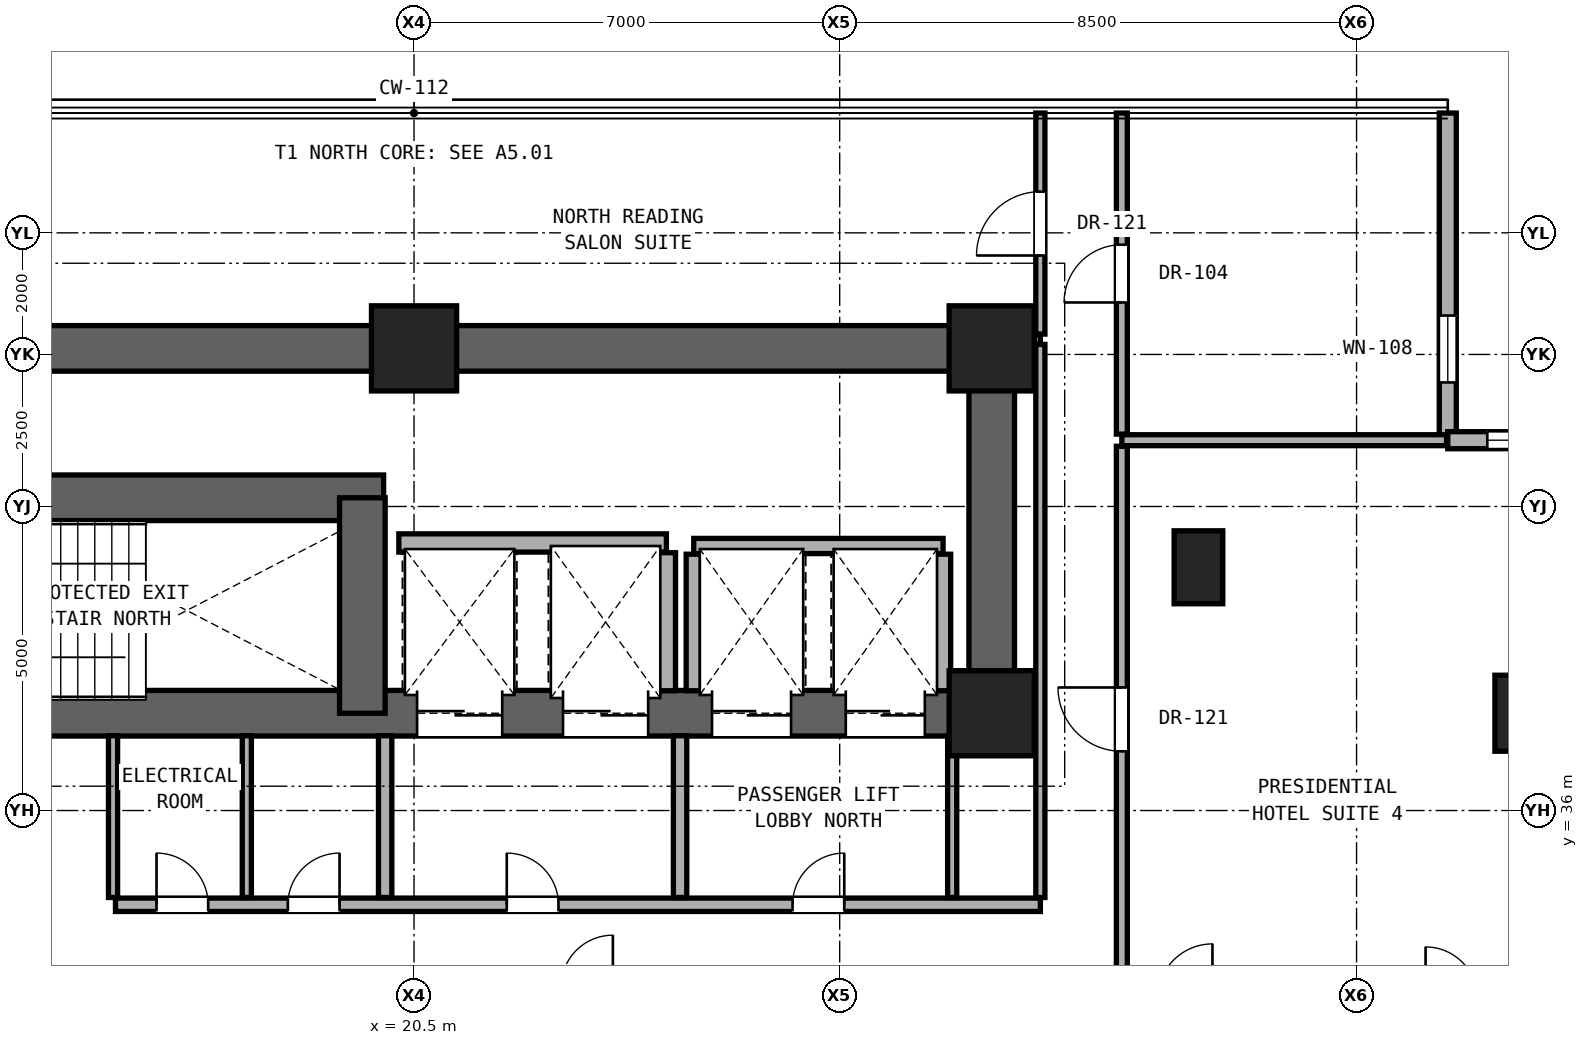
"""IFC4 building model, lengths in metres.
Left out: names, types, materials, properties, quantities, classifications, styles, units other than length and angle.
Written with IfcOpenShell. Run it as: python <this file> out.ifc"""

import sys

from ifc_helpers import new_model, si_unit, direction, frame, frame_2d, origin, origin_2d, place, context, subcontext, project, spatial, rectangle, hollow_rectangle, extrude, element, fill, save


model = new_model("IFC4")
c1 = context("Model", 3, precision=1e-05, world=origin(), true_north=direction((0.0, 1.0)))
c2 = subcontext(c1, "Body", "Model", "MODEL_VIEW")
j1 = project(units=[si_unit("LENGTHUNIT", "METRE"), si_unit("PLANEANGLEUNIT", "RADIAN")], contexts=[c1])
p1 = place(None, origin())
s1 = spatial("IfcSite", under=j1, at=p1, CompositionType="ELEMENT")
p2 = place(p1, origin())
s2 = spatial("IfcBuilding", under=s1, at=p2, CompositionType="ELEMENT")
p3 = place(p2, frame((0.0, 0.0, 38.9)))
s3 = spatial("IfcBuildingStorey", under=s2, at=p3, CompositionType="ELEMENT", Elevation=38.9)
for number, where, z_axis, x_axis in (
    (1, (30.0, 37.6, 0.0), (0.0, 0.0, 1.0), (1.0, 0.0, 0.0)),
    (2, (20.5, 43.6, 0.0), (0.0, 0.0, 1.0), (1.0, 0.0, 0.0)),
    (3, (30.0, 43.6, 0.0), (0.0, 0.0, 1.0), (1.0, 0.0, 0.0)),
):
    element("IfcColumn", number, at=place(p3, frame(where, z_axis=z_axis, x_axis=x_axis)), inside=s3, PredefinedType="COLUMN", context=c2, shape_type="SweptSolid", body=[
        extrude(rectangle(XDim=1.4, YDim=1.4, at=origin_2d()), origin(), (0.0, 0.0, 1.0), 3.3),
    ])
p4 = place(p3, frame((38.9, 37.6, 0.0), z_axis=(0.0, 0.0, 1.0), x_axis=(1.0, 0.0, 0.0)))
e4 = element("IfcColumn", 4, at=p4, inside=s3, PredefinedType="COLUMN", context=c2, shape_type="SweptSolid", body=[
    extrude(hollow_rectangle(XDim=1.25, YDim=1.25, WallThickness=0.07, at=origin_2d()), origin(), (0.0, 0.0, 1.0), 3.3),
])
p5 = place(p3, frame((33.4, 40.0, 0.0), z_axis=(0.0, 0.0, 1.0), x_axis=(1.0, 0.0, 0.0)))
e5 = element("IfcColumn", 5, at=p5, inside=s3, PredefinedType="PILASTER", context=c2, shape_type="SweptSolid", body=[
    extrude(rectangle(XDim=0.8, YDim=1.2, at=origin_2d()), origin(), (0.0, 0.0, 1.0), 3.3),
])
p6 = place(p3, frame((11.0, 43.6, 0.0), z_axis=(0.0, 0.0, 1.0), x_axis=(1.0, 0.0, 0.0)))
e6 = element("IfcWall", 6, at=p6, inside=s3, PredefinedType="SHEAR", context=c2, shape_type="SweptSolid", body=[
    extrude(rectangle(XDim=19.0, YDim=0.75, at=frame_2d((9.5, 0.0))), origin(), (0.0, 0.0, 1.0), 3.06),
])
p7 = place(p3, frame((30.0, 37.6, 0.0), z_axis=(0.0, 0.0, 1.0), x_axis=(0.0, 1.0, 0.0)))
e7 = element("IfcWall", 7, at=p7, inside=s3, PredefinedType="SHEAR", context=c2, shape_type="SweptSolid", body=[
    extrude(rectangle(XDim=6.0, YDim=0.75, at=frame_2d((3.0, 0.0))), origin(), (0.0, 0.0, 1.0), 3.06),
])
p8 = place(p3, frame((11.0, 37.6, 0.0), z_axis=(0.0, 0.0, 1.0), x_axis=(1.0, 0.0, 0.0)))
e8 = element("IfcWall", 8, at=p8, inside=s3, PredefinedType="SHEAR", context=c2, shape_type="SweptSolid", body=[
    extrude(rectangle(XDim=19.0, YDim=0.75, at=frame_2d((9.5, 0.0))), origin(), (0.0, 0.0, 1.0), 3.06),
])
p9 = place(p8, frame((1.06, 0.0, 0.0)))
e9 = element("IfcOpeningElement", 9, at=p9, cuts=e8, PredefinedType="OPENING", context=c2, shape_type="SweptSolid", body=[
    extrude(rectangle(XDim=1.15, YDim=2.2, at=frame_2d((0.575, 1.1))), frame((0.0, 0.385, 0.0), z_axis=(0.0, -1.0, 0.0), x_axis=(1.0, 0.0, 0.0)), (0.0, 0.0, 1.0), 0.77),
])
p10 = place(p8, frame((9.55, 0.0, 0.0)))
e10 = element("IfcOpeningElement", 10, at=p10, cuts=e8, PredefinedType="OPENING", context=c2, shape_type="SweptSolid", body=[
    extrude(rectangle(XDim=1.4, YDim=2.35, at=frame_2d((0.7, 1.175))), frame((0.0, 0.385, 0.0), z_axis=(0.0, -1.0, 0.0), x_axis=(1.0, 0.0, 0.0)), (0.0, 0.0, 1.0), 0.77),
])
p11 = place(p8, frame((11.95, 0.0, 0.0)))
e11 = element("IfcOpeningElement", 11, at=p11, cuts=e8, PredefinedType="OPENING", context=c2, shape_type="SweptSolid", body=[
    extrude(rectangle(XDim=1.4, YDim=2.35, at=frame_2d((0.7, 1.175))), frame((0.0, 0.385, 0.0), z_axis=(0.0, -1.0, 0.0), x_axis=(1.0, 0.0, 0.0)), (0.0, 0.0, 1.0), 0.77),
])
p12 = place(p8, frame((14.4, 0.0, 0.0)))
e12 = element("IfcOpeningElement", 12, at=p12, cuts=e8, PredefinedType="OPENING", context=c2, shape_type="SweptSolid", body=[
    extrude(rectangle(XDim=1.3, YDim=2.3, at=frame_2d((0.65, 1.15))), frame((0.0, 0.385, 0.0), z_axis=(0.0, -1.0, 0.0), x_axis=(1.0, 0.0, 0.0)), (0.0, 0.0, 1.0), 0.77),
])
p13 = place(p8, frame((16.6, 0.0, 0.0)))
e13 = element("IfcOpeningElement", 13, at=p13, cuts=e8, PredefinedType="OPENING", context=c2, shape_type="SweptSolid", body=[
    extrude(rectangle(XDim=1.3, YDim=2.3, at=frame_2d((0.65, 1.15))), frame((0.0, 0.385, 0.0), z_axis=(0.0, -1.0, 0.0), x_axis=(1.0, 0.0, 0.0)), (0.0, 0.0, 1.0), 0.77),
])
p14 = place(p3, frame((11.0, 41.143, 0.0), z_axis=(0.0, 0.0, 1.0), x_axis=(1.0, 0.0, 0.0)))
e14 = element("IfcWall", 14, at=p14, inside=s3, PredefinedType="SHEAR", context=c2, shape_type="SweptSolid", body=[
    extrude(rectangle(XDim=9.0, YDim=0.75, at=frame_2d((4.5, 0.0))), origin(), (0.0, 0.0, 1.0), 3.06),
])
p15 = place(p3, frame((19.65, 37.6, 0.0), z_axis=(0.0, 0.0, 1.0), x_axis=(0.0, 1.0, 0.0)))
e15 = element("IfcWall", 15, at=p15, inside=s3, PredefinedType="SHEAR", context=c2, shape_type="SweptSolid", body=[
    extrude(rectangle(XDim=3.543, YDim=0.75, at=frame_2d((1.771, 0.0))), origin(), (0.0, 0.0, 1.0), 3.06),
])
p16 = place(p3, frame((37.5, 42.09, 0.0), z_axis=(0.0, 0.0, 1.0), x_axis=(0.0, 1.0, 0.0)))
e16 = element("IfcWall", 16, at=p16, inside=s3, PredefinedType="SOLIDWALL", context=c2, shape_type="SweptSolid", body=[
    extrude(rectangle(XDim=5.38, YDim=0.28, at=frame_2d((2.69, 0.0))), origin(), (0.0, 0.0, 1.0), 3.04),
])
p17 = place(p16, frame((0.95, 0.0, 0.85)))
e17 = element("IfcOpeningElement", 17, at=p17, cuts=e16, PredefinedType="OPENING", context=c2, shape_type="SweptSolid", body=[
    extrude(rectangle(XDim=1.1, YDim=2.0, at=frame_2d((0.55, 1.0))), frame((0.0, 0.15, 0.0), z_axis=(0.0, -1.0, 0.0), x_axis=(1.0, 0.0, 0.0)), (0.0, 0.0, 1.0), 0.3),
])
p18 = place(p3, frame((42.88, 42.09, 0.0), z_axis=(0.0, 0.0, 1.0), x_axis=(-1.0, 0.0, 0.0)))
e18 = element("IfcWall", 18, at=p18, inside=s3, PredefinedType="SOLIDWALL", context=c2, shape_type="SweptSolid", body=[
    extrude(rectangle(XDim=5.38, YDim=0.28, at=frame_2d((2.69, 0.0))), origin(), (0.0, 0.0, 1.0), 3.04),
])
p19 = place(p18, frame((3.63, 0.0, 0.85)))
e19 = element("IfcOpeningElement", 19, at=p19, cuts=e18, PredefinedType="OPENING", context=c2, shape_type="SweptSolid", body=[
    extrude(rectangle(XDim=1.1, YDim=2.0, at=frame_2d((0.55, 1.0))), frame((0.0, 0.15, 0.0), z_axis=(0.0, -1.0, 0.0), x_axis=(1.0, 0.0, 0.0)), (0.0, 0.0, 1.0), 0.3),
])
p20 = place(p3, frame((15.59, 34.45, 0.0), z_axis=(0.0, 0.0, 1.0), x_axis=(1.0, 0.0, 0.0)))
e20 = element("IfcWall", 20, at=p20, inside=s3, PredefinedType="SOLIDWALL", context=c2, shape_type="SweptSolid", body=[
    extrude(rectangle(XDim=15.21, YDim=0.22, at=frame_2d((7.605, 0.0))), origin(), (0.0, 0.0, 1.0), 2.104),
])
p21 = place(p20, frame((6.435, 0.0, 0.0)))
e21 = element("IfcOpeningElement", 21, at=p21, cuts=e20, PredefinedType="OPENING", context=c2, shape_type="SweptSolid", body=[
    extrude(rectangle(XDim=0.85, YDim=2.01, at=frame_2d((0.425, 1.005))), frame((0.0, 0.12, 0.0), z_axis=(0.0, -1.0, 0.0), x_axis=(1.0, 0.0, 0.0)), (0.0, 0.0, 1.0), 0.24),
])
p22 = place(p20, frame((11.135, 0.0, 0.0)))
e22 = element("IfcOpeningElement", 22, at=p22, cuts=e20, PredefinedType="OPENING", context=c2, shape_type="SweptSolid", body=[
    extrude(rectangle(XDim=0.85, YDim=2.01, at=frame_2d((0.425, 1.005))), frame((0.0, 0.12, 0.0), z_axis=(0.0, -1.0, 0.0), x_axis=(1.0, 0.0, 0.0)), (0.0, 0.0, 1.0), 0.24),
])
p23 = place(p20, frame((0.675, 0.0, 0.0)))
e23 = element("IfcOpeningElement", 23, at=p23, cuts=e20, PredefinedType="OPENING", context=c2, shape_type="SweptSolid", body=[
    extrude(rectangle(XDim=0.85, YDim=2.01, at=frame_2d((0.425, 1.005))), frame((0.0, 0.12, 0.0), z_axis=(0.0, -1.0, 0.0), x_axis=(1.0, 0.0, 0.0)), (0.0, 0.0, 1.0), 0.24),
])
p24 = place(p20, frame((2.835, 0.0, 0.0)))
e24 = element("IfcOpeningElement", 24, at=p24, cuts=e20, PredefinedType="OPENING", context=c2, shape_type="SweptSolid", body=[
    extrude(rectangle(XDim=0.85, YDim=2.01, at=frame_2d((0.425, 1.005))), frame((0.0, 0.12, 0.0), z_axis=(0.0, -1.0, 0.0), x_axis=(1.0, 0.0, 0.0)), (0.0, 0.0, 1.0), 0.24),
])
p25 = place(p3, frame((25.1, 40.35, 0.0), z_axis=(0.0, 0.0, 1.0), x_axis=(1.0, 0.0, 0.0)))
e25 = element("IfcWall", 25, at=p25, inside=s3, PredefinedType="SOLIDWALL", context=c2, shape_type="SweptSolid", body=[
    extrude(rectangle(XDim=4.1, YDim=0.25, at=frame_2d((2.05, 0.0))), origin(), (0.0, 0.0, 1.0), 3.06),
])
p26 = place(p3, frame((20.25, 40.4, 0.0), z_axis=(0.0, 0.0, 1.0), x_axis=(1.0, 0.0, 0.0)))
e26 = element("IfcWall", 26, at=p26, inside=s3, PredefinedType="SOLIDWALL", context=c2, shape_type="SweptSolid", body=[
    extrude(rectangle(XDim=4.4, YDim=0.3, at=frame_2d((2.2, 0.0))), origin(), (0.0, 0.0, 1.0), 3.06),
])
p27 = place(p3, frame((32.14, 42.09, 0.0), z_axis=(0.0, 0.0, 1.0), x_axis=(1.0, 0.0, 0.0)))
e27 = element("IfcWall", 27, at=p27, inside=s3, PredefinedType="PARTITIONING", context=c2, shape_type="SweptSolid", body=[
    extrude(rectangle(XDim=5.34, YDim=0.18, at=frame_2d((2.67, 0.0))), origin(), (0.0, 0.0, 1.0), 3.06),
])
p28 = place(p3, frame((30.37, 43.75, 0.0), z_axis=(0.0, 0.0, 1.0), x_axis=(1.0, 0.0, 0.0)))
e28 = element("IfcWall", 28, at=p28, inside=s3, PredefinedType="PARTITIONING", context=c2, shape_type="SweptSolid", body=[
    extrude(rectangle(XDim=0.43, YDim=0.15, at=frame_2d((0.215, 0.0))), origin(), (0.0, 0.0, 1.0), 3.06),
])
p29 = place(p3, frame((15.55, 34.57, 0.0), z_axis=(0.0, 0.0, 1.0), x_axis=(0.0, 1.0, 0.0)))
e29 = element("IfcWall", 29, at=p29, inside=s3, PredefinedType="PARTITIONING", context=c2, shape_type="SweptSolid", body=[
    extrude(rectangle(XDim=2.66, YDim=0.15, at=frame_2d((1.33, 0.0))), origin(), (0.0, 0.0, 1.0), 2.589),
])
p30 = place(p3, frame((17.75, 34.57, 0.0), z_axis=(0.0, 0.0, 1.0), x_axis=(0.0, 1.0, 0.0)))
e30 = element("IfcWall", 30, at=p30, inside=s3, PredefinedType="PARTITIONING", context=c2, shape_type="SweptSolid", body=[
    extrude(rectangle(XDim=2.66, YDim=0.15, at=frame_2d((1.33, 0.0))), origin(), (0.0, 0.0, 1.0), 3.06),
])
p31 = place(p3, frame((20.025, 34.57, 0.0), z_axis=(0.0, 0.0, 1.0), x_axis=(0.0, 1.0, 0.0)))
e31 = element("IfcWall", 31, at=p31, inside=s3, PredefinedType="SOLIDWALL", context=c2, shape_type="SweptSolid", body=[
    extrude(rectangle(XDim=2.66, YDim=0.22, at=frame_2d((1.33, 0.0))), origin(), (0.0, 0.0, 1.0), 3.06),
])
p32 = place(p3, frame((24.65, 37.97, 0.0), z_axis=(0.0, 0.0, 1.0), x_axis=(0.0, 1.0, 0.0)))
e32 = element("IfcWall", 32, at=p32, inside=s3, PredefinedType="SOLIDWALL", context=c2, shape_type="SweptSolid", body=[
    extrude(rectangle(XDim=2.27, YDim=0.3, at=frame_2d((1.135, 0.0))), origin(), (0.0, 0.0, 1.0), 3.06),
])
p33 = place(p3, frame((24.875, 34.57, 0.0), z_axis=(0.0, 0.0, 1.0), x_axis=(0.0, 1.0, 0.0)))
e33 = element("IfcWall", 33, at=p33, inside=s3, PredefinedType="SOLIDWALL", context=c2, shape_type="SweptSolid", body=[
    extrude(rectangle(XDim=2.66, YDim=0.22, at=frame_2d((1.33, 0.0))), origin(), (0.0, 0.0, 1.0), 3.06),
])
p34 = place(p3, frame((25.1, 37.97, 0.0), z_axis=(0.0, 0.0, 1.0), x_axis=(0.0, 1.0, 0.0)))
e34 = element("IfcWall", 34, at=p34, inside=s3, PredefinedType="SOLIDWALL", context=c2, shape_type="SweptSolid", body=[
    extrude(rectangle(XDim=2.245, YDim=0.25, at=frame_2d((1.123, 0.0))), origin(), (0.0, 0.0, 1.0), 3.06),
])
p35 = place(p3, frame((29.35, 34.57, 0.0), z_axis=(0.0, 0.0, 1.0), x_axis=(0.0, 1.0, 0.0)))
e35 = element("IfcWall", 35, at=p35, inside=s3, PredefinedType="PARTITIONING", context=c2, shape_type="SweptSolid", body=[
    extrude(rectangle(XDim=2.66, YDim=0.15, at=frame_2d((1.33, 0.0))), origin(), (0.0, 0.0, 1.0), 3.06),
])
p36 = place(p3, frame((29.2, 37.97, 0.0), z_axis=(0.0, 0.0, 1.0), x_axis=(0.0, 1.0, 0.0)))
e36 = element("IfcWall", 36, at=p36, inside=s3, PredefinedType="SOLIDWALL", context=c2, shape_type="SweptSolid", body=[
    extrude(rectangle(XDim=2.245, YDim=0.25, at=frame_2d((1.123, 0.0))), origin(), (0.0, 0.0, 1.0), 3.06),
])
p37 = place(p3, frame((30.8, 34.57, 0.0), z_axis=(0.0, 0.0, 1.0), x_axis=(0.0, 1.0, 0.0)))
e37 = element("IfcWall", 37, at=p37, inside=s3, PredefinedType="PARTITIONING", context=c2, shape_type="SweptSolid", body=[
    extrude(rectangle(XDim=9.095, YDim=0.15, at=frame_2d((4.547, 0.0))), origin(), (0.0, 0.0, 1.0), 2.436),
])
p38 = place(p3, frame((30.8, 43.835, 0.0), z_axis=(0.0, 0.0, 1.0), x_axis=(0.0, 1.0, 0.0)))
e38 = element("IfcWall", 38, at=p38, inside=s3, PredefinedType="PARTITIONING", context=c2, shape_type="SweptSolid", body=[
    extrude(rectangle(XDim=3.635, YDim=0.15, at=frame_2d((1.817, 0.0))), origin(), (0.0, 0.0, 1.0), 3.06),
])
p39 = place(p38, frame((1.292, 0.0, 0.0)))
e39 = element("IfcOpeningElement", 39, at=p39, cuts=e38, PredefinedType="OPENING", context=c2, shape_type="SweptSolid", body=[
    extrude(rectangle(XDim=1.05, YDim=2.2, at=frame_2d((0.525, 1.1))), frame((0.0, 0.085, 0.0), z_axis=(0.0, -1.0, 0.0), x_axis=(1.0, 0.0, 0.0)), (0.0, 0.0, 1.0), 0.17),
])
p40 = place(p3, frame((32.14, 33.007, 0.0), z_axis=(0.0, 0.0, 1.0), x_axis=(0.0, 1.0, 0.0)))
e40 = element("IfcWall", 40, at=p40, inside=s3, PredefinedType="PARTITIONING", context=c2, shape_type="SweptSolid", body=[
    extrude(rectangle(XDim=8.983, YDim=0.18, at=frame_2d((4.491, 0.0))), origin(), (0.0, 0.0, 1.0), 2.436),
])
p41 = place(p40, frame((3.967, 0.0, 0.0)))
e41 = element("IfcOpeningElement", 41, at=p41, cuts=e40, PredefinedType="OPENING", context=c2, shape_type="SweptSolid", body=[
    extrude(rectangle(XDim=1.05, YDim=2.2, at=frame_2d((0.525, 1.1))), frame((0.0, 0.1, 0.0), z_axis=(0.0, -1.0, 0.0), x_axis=(1.0, 0.0, 0.0)), (0.0, 0.0, 1.0), 0.2),
])
p42 = place(p3, frame((32.14, 42.19, 0.0), z_axis=(0.0, 0.0, 1.0), x_axis=(0.0, 1.0, 0.0)))
e42 = element("IfcWall", 42, at=p42, inside=s3, PredefinedType="PARTITIONING", context=c2, shape_type="SweptSolid", body=[
    extrude(rectangle(XDim=5.28, YDim=0.18, at=frame_2d((2.64, 0.0))), origin(), (0.0, 0.0, 1.0), 3.06),
])
p43 = place(p42, frame((2.165, 0.0, 0.0)))
e43 = element("IfcOpeningElement", 43, at=p43, cuts=e42, PredefinedType="OPENING", context=c2, shape_type="SweptSolid", body=[
    extrude(rectangle(XDim=0.95, YDim=2.15, at=frame_2d((0.475, 1.075))), frame((0.0, 0.1, 0.0), z_axis=(0.0, -1.0, 0.0), x_axis=(1.0, 0.0, 0.0)), (0.0, 0.0, 1.0), 0.2),
])
p44 = place(p17, origin())
e44 = element("IfcWindow", 44, at=p44, inside=s3, PartitioningType="SINGLE_PANEL", PredefinedType="WINDOW", context=c2, shape_type="SweptSolid", body=[
    extrude(rectangle(XDim=1.1, YDim=2.0, at=frame_2d((0.55, 1.0))), frame((0.0, 0.03, 0.0), z_axis=(0.0, -1.0, 0.0), x_axis=(1.0, 0.0, 0.0)), (0.0, 0.0, 1.0), 0.06),
])
fill(e17, e44)
p45 = place(p19, origin())
e45 = element("IfcWindow", 45, at=p45, inside=s3, PartitioningType="SINGLE_PANEL", PredefinedType="WINDOW", context=c2, shape_type="SweptSolid", body=[
    extrude(rectangle(XDim=1.1, YDim=2.0, at=frame_2d((0.55, 1.0))), frame((0.0, 0.03, 0.0), z_axis=(0.0, -1.0, 0.0), x_axis=(1.0, 0.0, 0.0)), (0.0, 0.0, 1.0), 0.06),
])
fill(e19, e45)
p46 = place(p21, origin())
e46 = element("IfcDoor", 46, at=p46, inside=s3, OperationType="SINGLE_SWING_LEFT", PredefinedType="DOOR", context=c2, shape_type="SweptSolid", body=[
    extrude(rectangle(XDim=0.85, YDim=2.01, at=frame_2d((0.425, 1.005))), frame((0.0, 0.025, 0.0), z_axis=(0.0, -1.0, 0.0), x_axis=(1.0, 0.0, 0.0)), (0.0, 0.0, 1.0), 0.05),
])
fill(e21, e46)
p47 = place(p22, origin())
e47 = element("IfcDoor", 47, at=p47, inside=s3, OperationType="SINGLE_SWING_RIGHT", PredefinedType="DOOR", context=c2, shape_type="SweptSolid", body=[
    extrude(rectangle(XDim=0.85, YDim=2.01, at=frame_2d((0.425, 1.005))), frame((0.0, 0.025, 0.0), z_axis=(0.0, -1.0, 0.0), x_axis=(1.0, 0.0, 0.0)), (0.0, 0.0, 1.0), 0.05),
])
fill(e22, e47)
p48 = place(p23, origin())
e48 = element("IfcDoor", 48, at=p48, inside=s3, OperationType="SINGLE_SWING_LEFT", PredefinedType="DOOR", context=c2, shape_type="SweptSolid", body=[
    extrude(rectangle(XDim=0.85, YDim=2.01, at=frame_2d((0.425, 1.005))), frame((0.0, 0.025, 0.0), z_axis=(0.0, -1.0, 0.0), x_axis=(1.0, 0.0, 0.0)), (0.0, 0.0, 1.0), 0.05),
])
fill(e23, e48)
p49 = place(p24, origin())
e49 = element("IfcDoor", 49, at=p49, inside=s3, OperationType="SINGLE_SWING_RIGHT", PredefinedType="DOOR", context=c2, shape_type="SweptSolid", body=[
    extrude(rectangle(XDim=0.85, YDim=2.01, at=frame_2d((0.425, 1.005))), frame((0.0, 0.025, 0.0), z_axis=(0.0, -1.0, 0.0), x_axis=(1.0, 0.0, 0.0)), (0.0, 0.0, 1.0), 0.05),
])
fill(e24, e49)
p50 = place(p41, origin())
e50 = element("IfcDoor", 50, at=p50, inside=s3, OperationType="SINGLE_SWING_RIGHT", PredefinedType="DOOR", context=c2, shape_type="SweptSolid", body=[
    extrude(rectangle(XDim=1.05, YDim=2.2, at=frame_2d((0.525, 1.1))), frame((0.0, 0.025, 0.0), z_axis=(0.0, -1.0, 0.0), x_axis=(1.0, 0.0, 0.0)), (0.0, 0.0, 1.0), 0.05),
])
fill(e41, e50)
p51 = place(p39, origin())
e51 = element("IfcDoor", 51, at=p51, inside=s3, OperationType="SINGLE_SWING_LEFT", PredefinedType="DOOR", context=c2, shape_type="SweptSolid", body=[
    extrude(rectangle(XDim=1.05, YDim=2.2, at=frame_2d((0.525, 1.1))), frame((0.0, 0.025, 0.0), z_axis=(0.0, -1.0, 0.0), x_axis=(1.0, 0.0, 0.0)), (0.0, 0.0, 1.0), 0.05),
])
fill(e39, e51)
p52 = place(p43, origin())
e52 = element("IfcDoor", 52, at=p52, inside=s3, OperationType="SINGLE_SWING_LEFT", PredefinedType="DOOR", context=c2, shape_type="SweptSolid", body=[
    extrude(rectangle(XDim=0.95, YDim=2.15, at=frame_2d((0.475, 1.075))), frame((0.0, 0.025, 0.0), z_axis=(0.0, -1.0, 0.0), x_axis=(1.0, 0.0, 0.0)), (0.0, 0.0, 1.0), 0.05),
])
fill(e43, e52)
p53 = place(p10, origin())
e53 = element("IfcDoor", 53, at=p53, inside=s3, OperationType="DOUBLE_DOOR_SLIDING", PredefinedType="DOOR", context=c2, shape_type="SweptSolid", body=[
    extrude(rectangle(XDim=1.4, YDim=2.35, at=frame_2d((0.7, 1.175))), frame((0.0, 0.025, 0.0), z_axis=(0.0, -1.0, 0.0), x_axis=(1.0, 0.0, 0.0)), (0.0, 0.0, 1.0), 0.05),
])
fill(e10, e53)
p54 = place(p11, origin())
e54 = element("IfcDoor", 54, at=p54, inside=s3, OperationType="DOUBLE_DOOR_SLIDING", PredefinedType="DOOR", context=c2, shape_type="SweptSolid", body=[
    extrude(rectangle(XDim=1.4, YDim=2.35, at=frame_2d((0.7, 1.175))), frame((0.0, 0.025, 0.0), z_axis=(0.0, -1.0, 0.0), x_axis=(1.0, 0.0, 0.0)), (0.0, 0.0, 1.0), 0.05),
])
fill(e11, e54)
p55 = place(p12, origin())
e55 = element("IfcDoor", 55, at=p55, inside=s3, OperationType="DOUBLE_DOOR_SLIDING", PredefinedType="DOOR", context=c2, shape_type="SweptSolid", body=[
    extrude(rectangle(XDim=1.3, YDim=2.3, at=frame_2d((0.65, 1.15))), frame((0.0, 0.025, 0.0), z_axis=(0.0, -1.0, 0.0), x_axis=(1.0, 0.0, 0.0)), (0.0, 0.0, 1.0), 0.05),
])
fill(e12, e55)
p56 = place(p13, origin())
e56 = element("IfcDoor", 56, at=p56, inside=s3, OperationType="DOUBLE_DOOR_SLIDING", PredefinedType="DOOR", context=c2, shape_type="SweptSolid", body=[
    extrude(rectangle(XDim=1.3, YDim=2.3, at=frame_2d((0.65, 1.15))), frame((0.0, 0.025, 0.0), z_axis=(0.0, -1.0, 0.0), x_axis=(1.0, 0.0, 0.0)), (0.0, 0.0, 1.0), 0.05),
])
fill(e13, e56)
save(model, sys.argv[1])
